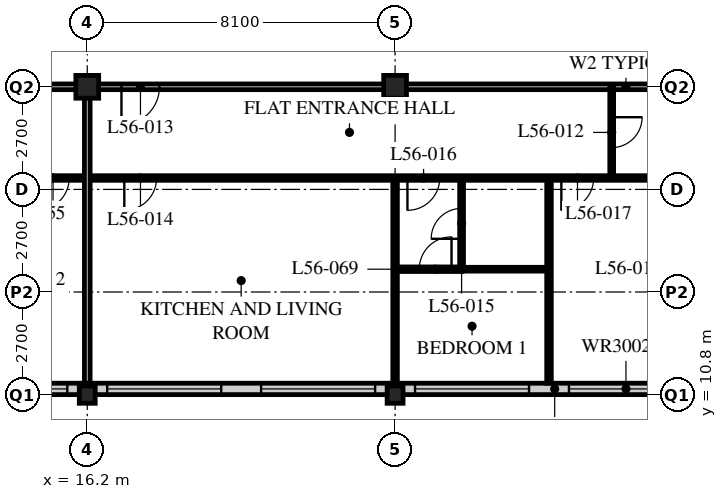
"""IFC4 building model, lengths in metres.
Left out: names, types, materials, properties, quantities, classifications, styles, units other than length and angle.
Written with IfcOpenShell. Run it as: python <this file> out.ifc"""

import sys

from ifc_helpers import new_model, si_unit, direction, frame, frame_2d, origin, origin_2d, place, context, subcontext, project, spatial, rectangle, hollow_rectangle, i_section, extrude, element, fill, save


model = new_model("IFC4")
c1 = context("Model", 3, precision=1e-05, world=origin(), true_north=direction((0.0, 1.0)))
c2 = subcontext(c1, "Body", "Model", "MODEL_VIEW")
j1 = project(units=[si_unit("LENGTHUNIT", "METRE"), si_unit("PLANEANGLEUNIT", "RADIAN")], contexts=[c1])
p1 = place(None, origin())
s1 = spatial("IfcSite", under=j1, at=p1, CompositionType="ELEMENT")
p2 = place(p1, origin())
s2 = spatial("IfcBuilding", under=s1, at=p2, CompositionType="ELEMENT")
p3 = place(p2, frame((0.0, 0.0, 217.2)))
s3 = spatial("IfcBuildingStorey", under=s2, at=p3, CompositionType="ELEMENT", Elevation=217.2)
p4 = place(p3, frame((16.2, 10.8, 0.0), z_axis=(0.0, 0.0, 1.0), x_axis=(1.0, 0.0, 0.0)))
e1 = element("IfcColumn", 1, at=p4, inside=s3, PredefinedType="COLUMN", context=c2, shape_type="SweptSolid", body=[
    extrude(i_section(OverallWidth=0.418, OverallDepth=0.456, WebThickness=0.042, FlangeThickness=0.067, FilletRadius=0.015, at=origin_2d()), origin(), (0.0, 0.0, 1.0), 3.6),
])
p5 = place(p3, frame((16.2, 18.9, 0.0), z_axis=(0.0, 0.0, 1.0), x_axis=(1.0, 0.0, 0.0)))
e2 = element("IfcColumn", 2, at=p5, inside=s3, PredefinedType="COLUMN", context=c2, shape_type="SweptSolid", body=[
    extrude(hollow_rectangle(XDim=0.6, YDim=0.6, WallThickness=0.05, at=origin_2d()), origin(), (0.0, 0.0, 1.0), 3.6),
])
p6 = place(p3, frame((24.3, 10.8, 0.0), z_axis=(0.0, 0.0, 1.0), x_axis=(1.0, 0.0, 0.0)))
e3 = element("IfcColumn", 3, at=p6, inside=s3, PredefinedType="COLUMN", context=c2, shape_type="SweptSolid", body=[
    extrude(i_section(OverallWidth=0.418, OverallDepth=0.456, WebThickness=0.042, FlangeThickness=0.067, FilletRadius=0.015, at=origin_2d()), origin(), (0.0, 0.0, 1.0), 3.6),
])
p7 = place(p3, frame((24.3, 18.9, 0.0), z_axis=(0.0, 0.0, 1.0), x_axis=(1.0, 0.0, 0.0)))
e4 = element("IfcColumn", 4, at=p7, inside=s3, PredefinedType="COLUMN", context=c2, shape_type="SweptSolid", body=[
    extrude(hollow_rectangle(XDim=0.6, YDim=0.6, WallThickness=0.05, at=origin_2d()), origin(), (0.0, 0.0, 1.0), 3.6),
])
p8 = place(p3, frame((8.4, 10.95, 0.0), z_axis=(0.0, 0.0, 1.0), x_axis=(1.0, 0.0, 0.0)))
e5 = element("IfcWall", 5, at=p8, inside=s3, PredefinedType="SOLIDWALL", context=c2, shape_type="SweptSolid", body=[
    extrude(rectangle(XDim=40.2, YDim=0.3, at=frame_2d((20.1, 0.0))), origin(), (0.0, 0.0, 1.0), 3.39),
])
p9 = place(p8, frame((0.225, 0.0, 0.6)))
e6 = element("IfcOpeningElement", 6, at=p9, cuts=e5, PredefinedType="OPENING", context=c2, shape_type="SweptSolid", body=[
    extrude(rectangle(XDim=3.0, YDim=2.4, at=frame_2d((1.5, 1.2))), frame((0.0, 0.16, 0.0), z_axis=(0.0, -1.0, 0.0), x_axis=(1.0, 0.0, 0.0)), (0.0, 0.0, 1.0), 0.32),
])
p10 = place(p8, frame((4.275, 0.0, 0.6)))
e7 = element("IfcOpeningElement", 7, at=p10, cuts=e5, PredefinedType="OPENING", context=c2, shape_type="SweptSolid", body=[
    extrude(rectangle(XDim=3.0, YDim=2.4, at=frame_2d((1.5, 1.2))), frame((0.0, 0.16, 0.0), z_axis=(0.0, -1.0, 0.0), x_axis=(1.0, 0.0, 0.0)), (0.0, 0.0, 1.0), 0.32),
])
p11 = place(p8, frame((8.325, 0.0, 0.6)))
e8 = element("IfcOpeningElement", 8, at=p11, cuts=e5, PredefinedType="OPENING", context=c2, shape_type="SweptSolid", body=[
    extrude(rectangle(XDim=3.0, YDim=2.4, at=frame_2d((1.5, 1.2))), frame((0.0, 0.16, 0.0), z_axis=(0.0, -1.0, 0.0), x_axis=(1.0, 0.0, 0.0)), (0.0, 0.0, 1.0), 0.32),
])
p12 = place(p8, frame((12.375, 0.0, 0.6)))
e9 = element("IfcOpeningElement", 9, at=p12, cuts=e5, PredefinedType="OPENING", context=c2, shape_type="SweptSolid", body=[
    extrude(rectangle(XDim=3.0, YDim=2.4, at=frame_2d((1.5, 1.2))), frame((0.0, 0.16, 0.0), z_axis=(0.0, -1.0, 0.0), x_axis=(1.0, 0.0, 0.0)), (0.0, 0.0, 1.0), 0.32),
])
p13 = place(p8, frame((16.425, 0.0, 0.6)))
e10 = element("IfcOpeningElement", 10, at=p13, cuts=e5, PredefinedType="OPENING", context=c2, shape_type="SweptSolid", body=[
    extrude(rectangle(XDim=3.0, YDim=2.4, at=frame_2d((1.5, 1.2))), frame((0.0, 0.16, 0.0), z_axis=(0.0, -1.0, 0.0), x_axis=(1.0, 0.0, 0.0)), (0.0, 0.0, 1.0), 0.32),
])
p14 = place(p8, frame((20.475, 0.0, 0.6)))
e11 = element("IfcOpeningElement", 11, at=p14, cuts=e5, PredefinedType="OPENING", context=c2, shape_type="SweptSolid", body=[
    extrude(rectangle(XDim=3.0, YDim=2.4, at=frame_2d((1.5, 1.2))), frame((0.0, 0.16, 0.0), z_axis=(0.0, -1.0, 0.0), x_axis=(1.0, 0.0, 0.0)), (0.0, 0.0, 1.0), 0.32),
])
p15 = place(p8, frame((24.525, 0.0, 0.6)))
e12 = element("IfcOpeningElement", 12, at=p15, cuts=e5, PredefinedType="OPENING", context=c2, shape_type="SweptSolid", body=[
    extrude(rectangle(XDim=3.0, YDim=2.4, at=frame_2d((1.5, 1.2))), frame((0.0, 0.16, 0.0), z_axis=(0.0, -1.0, 0.0), x_axis=(1.0, 0.0, 0.0)), (0.0, 0.0, 1.0), 0.32),
])
p16 = place(p8, frame((28.575, 0.0, 0.6)))
e13 = element("IfcOpeningElement", 13, at=p16, cuts=e5, PredefinedType="OPENING", context=c2, shape_type="SweptSolid", body=[
    extrude(rectangle(XDim=3.0, YDim=2.4, at=frame_2d((1.5, 1.2))), frame((0.0, 0.16, 0.0), z_axis=(0.0, -1.0, 0.0), x_axis=(1.0, 0.0, 0.0)), (0.0, 0.0, 1.0), 0.32),
])
p17 = place(p8, frame((32.625, 0.0, 0.6)))
e14 = element("IfcOpeningElement", 14, at=p17, cuts=e5, PredefinedType="OPENING", context=c2, shape_type="SweptSolid", body=[
    extrude(rectangle(XDim=3.0, YDim=2.4, at=frame_2d((1.5, 1.2))), frame((0.0, 0.16, 0.0), z_axis=(0.0, -1.0, 0.0), x_axis=(1.0, 0.0, 0.0)), (0.0, 0.0, 1.0), 0.32),
])
p18 = place(p8, frame((36.675, 0.0, 0.6)))
e15 = element("IfcOpeningElement", 15, at=p18, cuts=e5, PredefinedType="OPENING", context=c2, shape_type="SweptSolid", body=[
    extrude(rectangle(XDim=3.0, YDim=2.4, at=frame_2d((1.5, 1.2))), frame((0.0, 0.16, 0.0), z_axis=(0.0, -1.0, 0.0), x_axis=(1.0, 0.0, 0.0)), (0.0, 0.0, 1.0), 0.32),
])
p19 = place(p3, frame((12.15, 18.9, 0.0), z_axis=(0.0, 0.0, 1.0), x_axis=(1.0, 0.0, 0.0)))
e16 = element("IfcWall", 16, at=p19, inside=s3, PredefinedType="PARTITIONING", context=c2, shape_type="SweptSolid", body=[
    extrude(rectangle(XDim=36.45, YDim=0.15, at=frame_2d((18.225, 0.0))), origin(), (0.0, 0.0, 1.0), 2.778),
])
p20 = place(p19, frame((4.95, 0.0, 0.0)))
e17 = element("IfcOpeningElement", 17, at=p20, cuts=e16, PredefinedType="OPENING", context=c2, shape_type="SweptSolid", body=[
    extrude(rectangle(XDim=1.0, YDim=2.1, at=frame_2d((0.5, 1.05))), frame((0.0, 0.085, 0.0), z_axis=(0.0, -1.0, 0.0), x_axis=(1.0, 0.0, 0.0)), (0.0, 0.0, 1.0), 0.17),
])
p21 = place(p19, frame((22.6, 0.0, 0.0)))
e18 = element("IfcOpeningElement", 18, at=p21, cuts=e16, PredefinedType="OPENING", context=c2, shape_type="SweptSolid", body=[
    extrude(rectangle(XDim=1.0, YDim=2.1, at=frame_2d((0.5, 1.05))), frame((0.0, 0.085, 0.0), z_axis=(0.0, -1.0, 0.0), x_axis=(1.0, 0.0, 0.0)), (0.0, 0.0, 1.0), 0.17),
])
p22 = place(p19, frame((25.0, 0.0, 0.0)))
e19 = element("IfcOpeningElement", 19, at=p22, cuts=e16, PredefinedType="OPENING", context=c2, shape_type="SweptSolid", body=[
    extrude(rectangle(XDim=1.0, YDim=2.1, at=frame_2d((0.5, 1.05))), frame((0.0, 0.085, 0.0), z_axis=(0.0, -1.0, 0.0), x_axis=(1.0, 0.0, 0.0)), (0.0, 0.0, 1.0), 0.17),
])
p23 = place(p19, frame((30.7, 0.0, 0.0)))
e20 = element("IfcOpeningElement", 20, at=p23, cuts=e16, PredefinedType="OPENING", context=c2, shape_type="SweptSolid", body=[
    extrude(rectangle(XDim=1.0, YDim=2.1, at=frame_2d((0.5, 1.05))), frame((0.0, 0.085, 0.0), z_axis=(0.0, -1.0, 0.0), x_axis=(1.0, 0.0, 0.0)), (0.0, 0.0, 1.0), 0.17),
])
p24 = place(p19, frame((1.525, 0.0, 0.0)))
e21 = element("IfcOpeningElement", 21, at=p24, cuts=e16, PredefinedType="OPENING", context=c2, shape_type="SweptSolid", body=[
    extrude(rectangle(XDim=1.0, YDim=2.1, at=frame_2d((0.5, 1.05))), frame((0.0, 0.085, 0.0), z_axis=(0.0, -1.0, 0.0), x_axis=(1.0, 0.0, 0.0)), (0.0, 0.0, 1.0), 0.17),
])
p25 = place(p19, frame((32.825, 0.0, 0.0)))
e22 = element("IfcOpeningElement", 22, at=p25, cuts=e16, PredefinedType="OPENING", context=c2, shape_type="SweptSolid", body=[
    extrude(rectangle(XDim=1.0, YDim=2.1, at=frame_2d((0.5, 1.05))), frame((0.0, 0.085, 0.0), z_axis=(0.0, -1.0, 0.0), x_axis=(1.0, 0.0, 0.0)), (0.0, 0.0, 1.0), 0.17),
])
p26 = place(p3, frame((30.0, 18.9, 0.0), z_axis=(0.0, 0.0, 1.0), x_axis=(0.0, -1.0, 0.0)))
e23 = element("IfcWall", 23, at=p26, inside=s3, PredefinedType="PARTITIONING", context=c2, shape_type="SweptSolid", body=[
    extrude(rectangle(XDim=2.4, YDim=0.1, at=frame_2d((1.2, 0.0))), origin(), (0.0, 0.0, 1.0), 3.39),
])
p27 = place(p26, frame((0.8, 0.0, 0.0)))
e24 = element("IfcOpeningElement", 24, at=p27, cuts=e23, PredefinedType="OPENING", context=c2, shape_type="SweptSolid", body=[
    extrude(rectangle(XDim=0.8, YDim=2.1, at=frame_2d((0.4, 1.05))), frame((0.0, 0.06, 0.0), z_axis=(0.0, -1.0, 0.0), x_axis=(1.0, 0.0, 0.0)), (0.0, 0.0, 1.0), 0.12),
])
p28 = place(p3, frame((26.05, 16.5, 0.0), z_axis=(0.0, 0.0, 1.0), x_axis=(0.0, -1.0, 0.0)))
e25 = element("IfcWall", 25, at=p28, inside=s3, PredefinedType="PARTITIONING", context=c2, shape_type="SweptSolid", body=[
    extrude(rectangle(XDim=2.4, YDim=0.1, at=frame_2d((1.2, 0.0))), origin(), (0.0, 0.0, 1.0), 3.39),
])
p29 = place(p28, frame((0.8, 0.0, 0.0)))
e26 = element("IfcOpeningElement", 26, at=p29, cuts=e25, PredefinedType="OPENING", context=c2, shape_type="SweptSolid", body=[
    extrude(rectangle(XDim=0.8, YDim=2.1, at=frame_2d((0.4, 1.05))), frame((0.0, 0.06, 0.0), z_axis=(0.0, -1.0, 0.0), x_axis=(1.0, 0.0, 0.0)), (0.0, 0.0, 1.0), 0.12),
])
p30 = place(p3, frame((26.05, 14.1, 0.0), z_axis=(0.0, 0.0, 1.0), x_axis=(1.0, 0.0, 0.0)))
e27 = element("IfcWall", 27, at=p30, inside=s3, PredefinedType="PARTITIONING", context=c2, shape_type="SweptSolid", body=[
    extrude(rectangle(XDim=2.3, YDim=0.1, at=frame_2d((1.15, 0.0))), origin(), (0.0, 0.0, 1.0), 3.39),
])
p31 = place(p3, frame((24.3, 16.5, 0.0), z_axis=(0.0, 0.0, 1.0), x_axis=(0.0, -1.0, 0.0)))
e28 = element("IfcWall", 28, at=p31, inside=s3, PredefinedType="PARTITIONING", context=c2, shape_type="SweptSolid", body=[
    extrude(rectangle(XDim=5.4, YDim=0.12, at=frame_2d((2.7, 0.0))), origin(), (0.0, 0.0, 1.0), 2.778),
])
p32 = place(p3, frame((28.35, 16.5, 0.0), z_axis=(0.0, 0.0, 1.0), x_axis=(0.0, -1.0, 0.0)))
e29 = element("IfcWall", 29, at=p32, inside=s3, PredefinedType="PARTITIONING", context=c2, shape_type="SweptSolid", body=[
    extrude(rectangle(XDim=5.4, YDim=0.12, at=frame_2d((2.7, 0.0))), origin(), (0.0, 0.0, 1.0), 3.39),
])
p33 = place(p3, frame((8.15, 16.5, 0.0), z_axis=(0.0, 0.0, 1.0), x_axis=(1.0, 0.0, 0.0)))
e30 = element("IfcWall", 30, at=p33, inside=s3, PredefinedType="PARTITIONING", context=c2, shape_type="SweptSolid", body=[
    extrude(rectangle(XDim=24.25, YDim=0.12, at=frame_2d((12.125, 0.0))), origin(), (0.0, 0.0, 1.0), 3.39),
])
p34 = place(p33, frame((9.025, 0.0, 0.0)))
e31 = element("IfcOpeningElement", 31, at=p34, cuts=e30, PredefinedType="OPENING", context=c2, shape_type="SweptSolid", body=[
    extrude(rectangle(XDim=0.85, YDim=2.1, at=frame_2d((0.425, 1.05))), frame((0.0, 0.07, 0.0), z_axis=(0.0, -1.0, 0.0), x_axis=(1.0, 0.0, 0.0)), (0.0, 0.0, 1.0), 0.14),
])
p35 = place(p33, frame((16.475, 0.0, 0.0)))
e32 = element("IfcOpeningElement", 32, at=p35, cuts=e30, PredefinedType="OPENING", context=c2, shape_type="SweptSolid", body=[
    extrude(rectangle(XDim=0.85, YDim=2.1, at=frame_2d((0.425, 1.05))), frame((0.0, 0.07, 0.0), z_axis=(0.0, -1.0, 0.0), x_axis=(1.0, 0.0, 0.0)), (0.0, 0.0, 1.0), 0.14),
])
p36 = place(p33, frame((20.525, 0.0, 0.0)))
e33 = element("IfcOpeningElement", 33, at=p36, cuts=e30, PredefinedType="OPENING", context=c2, shape_type="SweptSolid", body=[
    extrude(rectangle(XDim=0.85, YDim=2.1, at=frame_2d((0.425, 1.05))), frame((0.0, 0.07, 0.0), z_axis=(0.0, -1.0, 0.0), x_axis=(1.0, 0.0, 0.0)), (0.0, 0.0, 1.0), 0.14),
])
p37 = place(p33, frame((6.725, 0.0, 0.0)))
e34 = element("IfcOpeningElement", 34, at=p37, cuts=e30, PredefinedType="OPENING", context=c2, shape_type="SweptSolid", body=[
    extrude(rectangle(XDim=0.85, YDim=2.1, at=frame_2d((0.425, 1.05))), frame((0.0, 0.07, 0.0), z_axis=(0.0, -1.0, 0.0), x_axis=(1.0, 0.0, 0.0)), (0.0, 0.0, 1.0), 0.14),
])
p38 = place(p33, frame((2.875, 0.0, 0.0)))
e35 = element("IfcOpeningElement", 35, at=p38, cuts=e30, PredefinedType="OPENING", context=c2, shape_type="SweptSolid", body=[
    extrude(rectangle(XDim=0.85, YDim=2.1, at=frame_2d((0.425, 1.05))), frame((0.0, 0.07, 0.0), z_axis=(0.0, -1.0, 0.0), x_axis=(1.0, 0.0, 0.0)), (0.0, 0.0, 1.0), 0.14),
])
p39 = place(p3, frame((16.2, 18.9, 0.0), z_axis=(0.0, 0.0, 1.0), x_axis=(0.0, -1.0, 0.0)))
e36 = element("IfcWall", 36, at=p39, inside=s3, PredefinedType="PARTITIONING", context=c2, shape_type="SweptSolid", body=[
    extrude(rectangle(XDim=7.8, YDim=0.15, at=frame_2d((3.9, 0.0))), origin(), (0.0, 0.0, 1.0), 2.778),
])
p40 = place(p3, frame((26.06, 14.1, 0.0), z_axis=(0.0, 0.0, 1.0), x_axis=(-1.0, 0.0, 0.0)))
e37 = element("IfcWall", 37, at=p40, inside=s3, PredefinedType="PARTITIONING", context=c2, shape_type="SweptSolid", body=[
    extrude(rectangle(XDim=1.76, YDim=0.12, at=frame_2d((0.88, 0.0))), origin(), (0.0, 0.0, 1.0), 3.39),
])
p41 = place(p40, frame((0.275, 0.0, 0.0)))
e38 = element("IfcOpeningElement", 38, at=p41, cuts=e37, PredefinedType="OPENING", context=c2, shape_type="SweptSolid", body=[
    extrude(rectangle(XDim=0.85, YDim=2.1, at=frame_2d((0.425, 1.05))), frame((0.0, 0.07, 0.0), z_axis=(0.0, -1.0, 0.0), x_axis=(1.0, 0.0, 0.0)), (0.0, 0.0, 1.0), 0.14),
])
p42 = place(p10, origin())
e39 = element("IfcWindow", 39, at=p42, inside=s3, PartitioningType="SINGLE_PANEL", PredefinedType="WINDOW", context=c2, shape_type="SweptSolid", body=[
    extrude(rectangle(XDim=3.0, YDim=2.4, at=frame_2d((1.5, 1.2))), frame((0.0, 0.03, 0.0), z_axis=(0.0, -1.0, 0.0), x_axis=(1.0, 0.0, 0.0)), (0.0, 0.0, 1.0), 0.06),
])
fill(e7, e39)
p43 = place(p11, origin())
e40 = element("IfcWindow", 40, at=p43, inside=s3, PartitioningType="SINGLE_PANEL", PredefinedType="WINDOW", context=c2, shape_type="SweptSolid", body=[
    extrude(rectangle(XDim=3.0, YDim=2.4, at=frame_2d((1.5, 1.2))), frame((0.0, 0.03, 0.0), z_axis=(0.0, -1.0, 0.0), x_axis=(1.0, 0.0, 0.0)), (0.0, 0.0, 1.0), 0.06),
])
fill(e8, e40)
p44 = place(p12, origin())
e41 = element("IfcWindow", 41, at=p44, inside=s3, PartitioningType="SINGLE_PANEL", PredefinedType="WINDOW", context=c2, shape_type="SweptSolid", body=[
    extrude(rectangle(XDim=3.0, YDim=2.4, at=frame_2d((1.5, 1.2))), frame((0.0, 0.03, 0.0), z_axis=(0.0, -1.0, 0.0), x_axis=(1.0, 0.0, 0.0)), (0.0, 0.0, 1.0), 0.06),
])
fill(e9, e41)
p45 = place(p13, origin())
e42 = element("IfcWindow", 42, at=p45, inside=s3, PartitioningType="SINGLE_PANEL", PredefinedType="WINDOW", context=c2, shape_type="SweptSolid", body=[
    extrude(rectangle(XDim=3.0, YDim=2.4, at=frame_2d((1.5, 1.2))), frame((0.0, 0.03, 0.0), z_axis=(0.0, -1.0, 0.0), x_axis=(1.0, 0.0, 0.0)), (0.0, 0.0, 1.0), 0.06),
])
fill(e10, e42)
p46 = place(p14, origin())
e43 = element("IfcWindow", 43, at=p46, inside=s3, PartitioningType="SINGLE_PANEL", PredefinedType="WINDOW", context=c2, shape_type="SweptSolid", body=[
    extrude(rectangle(XDim=3.0, YDim=2.4, at=frame_2d((1.5, 1.2))), frame((0.0, 0.03, 0.0), z_axis=(0.0, -1.0, 0.0), x_axis=(1.0, 0.0, 0.0)), (0.0, 0.0, 1.0), 0.06),
])
fill(e11, e43)
p47 = place(p27, origin())
e44 = element("IfcDoor", 44, at=p47, inside=s3, OperationType="SINGLE_SWING_LEFT", PredefinedType="DOOR", context=c2, shape_type="SweptSolid", body=[
    extrude(rectangle(XDim=0.8, YDim=2.1, at=frame_2d((0.4, 1.05))), frame((0.0, 0.025, 0.0), z_axis=(0.0, -1.0, 0.0), x_axis=(1.0, 0.0, 0.0)), (0.0, 0.0, 1.0), 0.05),
])
fill(e24, e44)
p48 = place(p20, origin())
e45 = element("IfcDoor", 45, at=p48, inside=s3, OperationType="SINGLE_SWING_RIGHT", PredefinedType="DOOR", context=c2, shape_type="SweptSolid", body=[
    extrude(rectangle(XDim=1.0, YDim=2.1, at=frame_2d((0.5, 1.05))), frame((0.0, 0.025, 0.0), z_axis=(0.0, -1.0, 0.0), x_axis=(1.0, 0.0, 0.0)), (0.0, 0.0, 1.0), 0.05),
])
fill(e17, e45)
p49 = place(p34, origin())
e46 = element("IfcDoor", 46, at=p49, inside=s3, OperationType="SINGLE_SWING_RIGHT", PredefinedType="DOOR", context=c2, shape_type="SweptSolid", body=[
    extrude(rectangle(XDim=0.85, YDim=2.1, at=frame_2d((0.425, 1.05))), frame((0.0, 0.025, 0.0), z_axis=(0.0, -1.0, 0.0), x_axis=(1.0, 0.0, 0.0)), (0.0, 0.0, 1.0), 0.05),
])
fill(e31, e46)
p50 = place(p29, origin())
e47 = element("IfcDoor", 47, at=p50, inside=s3, OperationType="SINGLE_SWING_LEFT", PredefinedType="DOOR", context=c2, shape_type="SweptSolid", body=[
    extrude(rectangle(XDim=0.8, YDim=2.1, at=frame_2d((0.4, 1.05))), frame((0.0, 0.025, 0.0), z_axis=(0.0, -1.0, 0.0), x_axis=(1.0, 0.0, 0.0)), (0.0, 0.0, 1.0), 0.05),
])
fill(e26, e47)
p51 = place(p35, origin())
e48 = element("IfcDoor", 48, at=p51, inside=s3, OperationType="SINGLE_SWING_RIGHT", PredefinedType="DOOR", context=c2, shape_type="SweptSolid", body=[
    extrude(rectangle(XDim=0.85, YDim=2.1, at=frame_2d((0.425, 1.05))), frame((0.0, 0.025, 0.0), z_axis=(0.0, -1.0, 0.0), x_axis=(1.0, 0.0, 0.0)), (0.0, 0.0, 1.0), 0.05),
])
fill(e32, e48)
p52 = place(p36, origin())
e49 = element("IfcDoor", 49, at=p52, inside=s3, OperationType="SINGLE_SWING_RIGHT", PredefinedType="DOOR", context=c2, shape_type="SweptSolid", body=[
    extrude(rectangle(XDim=0.85, YDim=2.1, at=frame_2d((0.425, 1.05))), frame((0.0, 0.025, 0.0), z_axis=(0.0, -1.0, 0.0), x_axis=(1.0, 0.0, 0.0)), (0.0, 0.0, 1.0), 0.05),
])
fill(e33, e49)
p53 = place(p37, origin())
e50 = element("IfcDoor", 50, at=p53, inside=s3, OperationType="SINGLE_SWING_RIGHT", PredefinedType="DOOR", context=c2, shape_type="SweptSolid", body=[
    extrude(rectangle(XDim=0.85, YDim=2.1, at=frame_2d((0.425, 1.05))), frame((0.0, 0.025, 0.0), z_axis=(0.0, -1.0, 0.0), x_axis=(1.0, 0.0, 0.0)), (0.0, 0.0, 1.0), 0.05),
])
fill(e34, e50)
p54 = place(p41, origin())
e51 = element("IfcDoor", 51, at=p54, inside=s3, OperationType="SINGLE_SWING_RIGHT", PredefinedType="DOOR", context=c2, shape_type="SweptSolid", body=[
    extrude(rectangle(XDim=0.85, YDim=2.1, at=frame_2d((0.425, 1.05))), frame((0.0, 0.025, 0.0), z_axis=(0.0, -1.0, 0.0), x_axis=(1.0, 0.0, 0.0)), (0.0, 0.0, 1.0), 0.05),
])
fill(e38, e51)
save(model, sys.argv[1])
